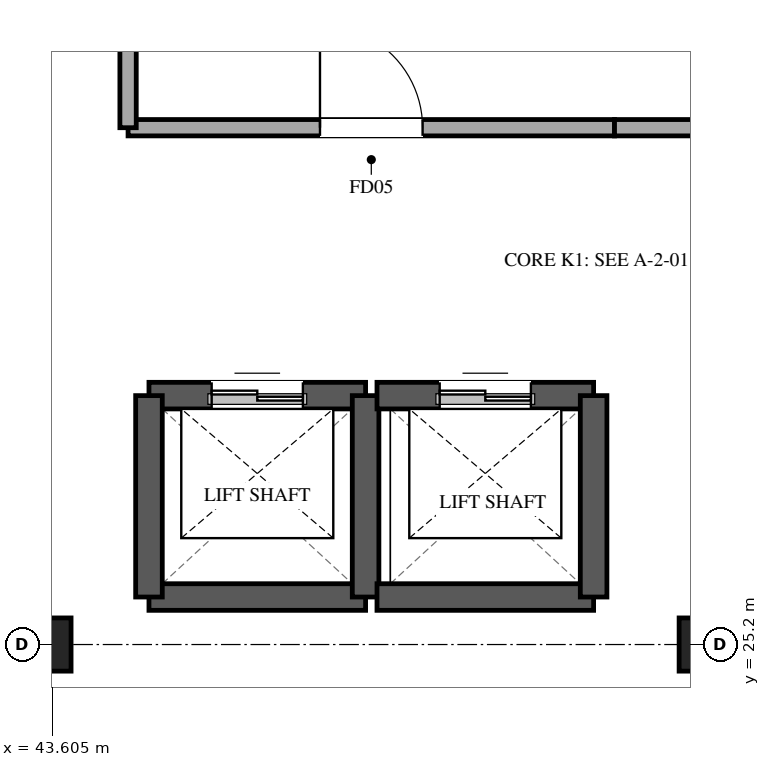
"""IFC4 building model, lengths in metres.
Left out: names, types, materials, properties, quantities, classifications, styles, units other than length and angle.
Written with IfcOpenShell. Run it as: python <this file> out.ifc"""

import sys

from ifc_helpers import new_model, si_unit, direction, frame, frame_2d, origin, origin_2d, place, context, subcontext, project, spatial, rectangle, extrude, element, fill, save


model = new_model("IFC4")
c1 = context("Model", 3, precision=1e-05, world=origin(), true_north=direction((0.0, 1.0)))
c2 = subcontext(c1, "Body", "Model", "MODEL_VIEW")
j1 = project(units=[si_unit("LENGTHUNIT", "METRE"), si_unit("PLANEANGLEUNIT", "RADIAN")], contexts=[c1])
p1 = place(None, origin())
s1 = spatial("IfcSite", under=j1, at=p1, CompositionType="ELEMENT")
p2 = place(p1, origin())
s2 = spatial("IfcBuilding", under=s1, at=p2, CompositionType="ELEMENT")
p3 = place(p2, frame((0.0, 0.0, 31.5)))
s3 = spatial("IfcBuildingStorey", under=s2, at=p3, CompositionType="ELEMENT", Elevation=31.5)
for number, where, z_axis, x_axis in (
    (1, (43.5, 25.2, 0.0), (0.0, 0.0, 1.0), (1.0, 0.0, 0.0)),
    (2, (52.2, 25.2, 0.0), (0.0, 0.0, 1.0), (1.0, 0.0, 0.0)),
):
    element("IfcColumn", number, at=place(p3, frame(where, z_axis=z_axis, x_axis=x_axis)), inside=s3, PredefinedType="COLUMN", context=c2, shape_type="SweptSolid", body=[
        extrude(rectangle(XDim=0.7, YDim=0.7, at=origin_2d()), origin(), (0.0, 0.0, 1.0), 4.8),
    ])
p4 = place(p3, frame((44.875, 28.475, 0.0), z_axis=(0.0, 0.0, 1.0), x_axis=(1.0, 0.0, 0.0)))
e3 = element("IfcWall", 3, at=p4, inside=s3, PredefinedType="SHEAR", context=c2, shape_type="SweptSolid", body=[
    extrude(rectangle(XDim=2.85, YDim=0.35, at=frame_2d((1.425, 0.0))), origin(), (0.0, 0.0, 1.0), 4.8),
])
p5 = place(p4, frame((0.825, 0.0, 0.0)))
e4 = element("IfcOpeningElement", 4, at=p5, cuts=e3, PredefinedType="OPENING", context=c2, shape_type="SweptSolid", body=[
    extrude(rectangle(XDim=1.2, YDim=2.2, at=frame_2d((0.6, 1.1))), frame((0.0, 0.185, 0.0), z_axis=(0.0, -1.0, 0.0), x_axis=(1.0, 0.0, 0.0)), (0.0, 0.0, 1.0), 0.37),
])
p6 = place(p3, frame((47.725, 25.825, 0.0), z_axis=(0.0, 0.0, 1.0), x_axis=(-1.0, 0.0, 0.0)))
e5 = element("IfcWall", 5, at=p6, inside=s3, PredefinedType="SHEAR", context=c2, shape_type="SweptSolid", body=[
    extrude(rectangle(XDim=2.85, YDim=0.35, at=frame_2d((1.425, 0.0))), origin(), (0.0, 0.0, 1.0), 4.8),
])
for number, where, z_axis, x_axis in (
    (6, (44.875, 25.825, 0.0), (0.0, 0.0, 1.0), (0.0, 1.0, 0.0)),
    (7, (47.725, 28.475, 0.0), (0.0, 0.0, 1.0), (0.0, -1.0, 0.0)),
):
    element("IfcWall", number, at=place(p3, frame(where, z_axis=z_axis, x_axis=x_axis)), inside=s3, PredefinedType="SHEAR", context=c2, shape_type="SweptSolid", body=[
        extrude(rectangle(XDim=2.65, YDim=0.35, at=frame_2d((1.325, 0.0))), origin(), (0.0, 0.0, 1.0), 4.8),
    ])
p7 = place(p3, frame((47.875, 28.475, 0.0), z_axis=(0.0, 0.0, 1.0), x_axis=(1.0, 0.0, 0.0)))
e8 = element("IfcWall", 8, at=p7, inside=s3, PredefinedType="SHEAR", context=c2, shape_type="SweptSolid", body=[
    extrude(rectangle(XDim=2.85, YDim=0.35, at=frame_2d((1.425, 0.0))), origin(), (0.0, 0.0, 1.0), 4.8),
])
p8 = place(p7, frame((0.825, 0.0, 0.0)))
e9 = element("IfcOpeningElement", 9, at=p8, cuts=e8, PredefinedType="OPENING", context=c2, shape_type="SweptSolid", body=[
    extrude(rectangle(XDim=1.2, YDim=2.2, at=frame_2d((0.6, 1.1))), frame((0.0, 0.185, 0.0), z_axis=(0.0, -1.0, 0.0), x_axis=(1.0, 0.0, 0.0)), (0.0, 0.0, 1.0), 0.37),
])
p9 = place(p3, frame((50.725, 25.825, 0.0), z_axis=(0.0, 0.0, 1.0), x_axis=(-1.0, 0.0, 0.0)))
e10 = element("IfcWall", 10, at=p9, inside=s3, PredefinedType="SHEAR", context=c2, shape_type="SweptSolid", body=[
    extrude(rectangle(XDim=2.85, YDim=0.35, at=frame_2d((1.425, 0.0))), origin(), (0.0, 0.0, 1.0), 4.8),
])
p10 = place(p3, frame((50.725, 28.475, 0.0), z_axis=(0.0, 0.0, 1.0), x_axis=(0.0, -1.0, 0.0)))
e11 = element("IfcWall", 11, at=p10, inside=s3, PredefinedType="SHEAR", context=c2, shape_type="SweptSolid", body=[
    extrude(rectangle(XDim=2.65, YDim=0.35, at=frame_2d((1.325, 0.0))), origin(), (0.0, 0.0, 1.0), 4.8),
])
p11 = place(p3, frame((44.6, 32.0, 0.0), z_axis=(0.0, 0.0, 1.0), x_axis=(1.0, 0.0, 0.0)))
e12 = element("IfcWall", 12, at=p11, inside=s3, PredefinedType="PARTITIONING", context=c2, shape_type="SweptSolid", body=[
    extrude(rectangle(XDim=6.4, YDim=0.215, at=frame_2d((3.2, 0.0))), origin(), (0.0, 0.0, 1.0), 4.46),
])
p12 = place(p11, frame((2.525, 0.0, 0.0)))
e13 = element("IfcOpeningElement", 13, at=p12, cuts=e12, PredefinedType="OPENING", context=c2, shape_type="SweptSolid", body=[
    extrude(rectangle(XDim=1.35, YDim=2.2, at=frame_2d((0.675, 1.1))), frame((0.0, 0.118, 0.0), z_axis=(0.0, -1.0, 0.0), x_axis=(1.0, 0.0, 0.0)), (0.0, 0.0, 1.0), 0.235),
])
p13 = place(p3, frame((44.6, 32.0, 0.0), z_axis=(0.0, 0.0, 1.0), x_axis=(0.0, 1.0, 0.0)))
e14 = element("IfcWall", 14, at=p13, inside=s3, PredefinedType="PARTITIONING", context=c2, shape_type="SweptSolid", body=[
    extrude(rectangle(XDim=2.98, YDim=0.215, at=frame_2d((1.49, 0.0))), origin(), (0.0, 0.0, 1.0), 3.76),
])
p14 = place(p3, frame((52.8, 32.0, 0.0), z_axis=(0.0, 0.0, 1.0), x_axis=(-1.0, 0.0, 0.0)))
e15 = element("IfcWall", 15, at=p14, inside=s3, PredefinedType="PARTITIONING", context=c2, shape_type="SweptSolid", body=[
    extrude(rectangle(XDim=1.8, YDim=0.215, at=frame_2d((0.9, 0.0))), origin(), (0.0, 0.0, 1.0), 3.76),
])
p15 = place(p5, origin())
e16 = element("IfcDoor", 16, at=p15, inside=s3, OperationType="DOUBLE_DOOR_SLIDING", PredefinedType="DOOR", context=c2, shape_type="SweptSolid", body=[
    extrude(rectangle(XDim=1.2, YDim=2.2, at=frame_2d((0.6, 1.1))), frame((0.0, 0.025, 0.0), z_axis=(0.0, -1.0, 0.0), x_axis=(1.0, 0.0, 0.0)), (0.0, 0.0, 1.0), 0.05),
])
fill(e4, e16)
p16 = place(p8, origin())
e17 = element("IfcDoor", 17, at=p16, inside=s3, OperationType="DOUBLE_DOOR_SLIDING", PredefinedType="DOOR", context=c2, shape_type="SweptSolid", body=[
    extrude(rectangle(XDim=1.2, YDim=2.2, at=frame_2d((0.6, 1.1))), frame((0.0, 0.025, 0.0), z_axis=(0.0, -1.0, 0.0), x_axis=(1.0, 0.0, 0.0)), (0.0, 0.0, 1.0), 0.05),
])
fill(e9, e17)
p17 = place(p12, origin())
e18 = element("IfcDoor", 18, at=p17, inside=s3, OperationType="SINGLE_SWING_LEFT", PredefinedType="DOOR", context=c2, shape_type="SweptSolid", body=[
    extrude(rectangle(XDim=1.35, YDim=2.2, at=frame_2d((0.675, 1.1))), frame((0.0, 0.025, 0.0), z_axis=(0.0, -1.0, 0.0), x_axis=(1.0, 0.0, 0.0)), (0.0, 0.0, 1.0), 0.05),
])
fill(e13, e18)
save(model, sys.argv[1])
